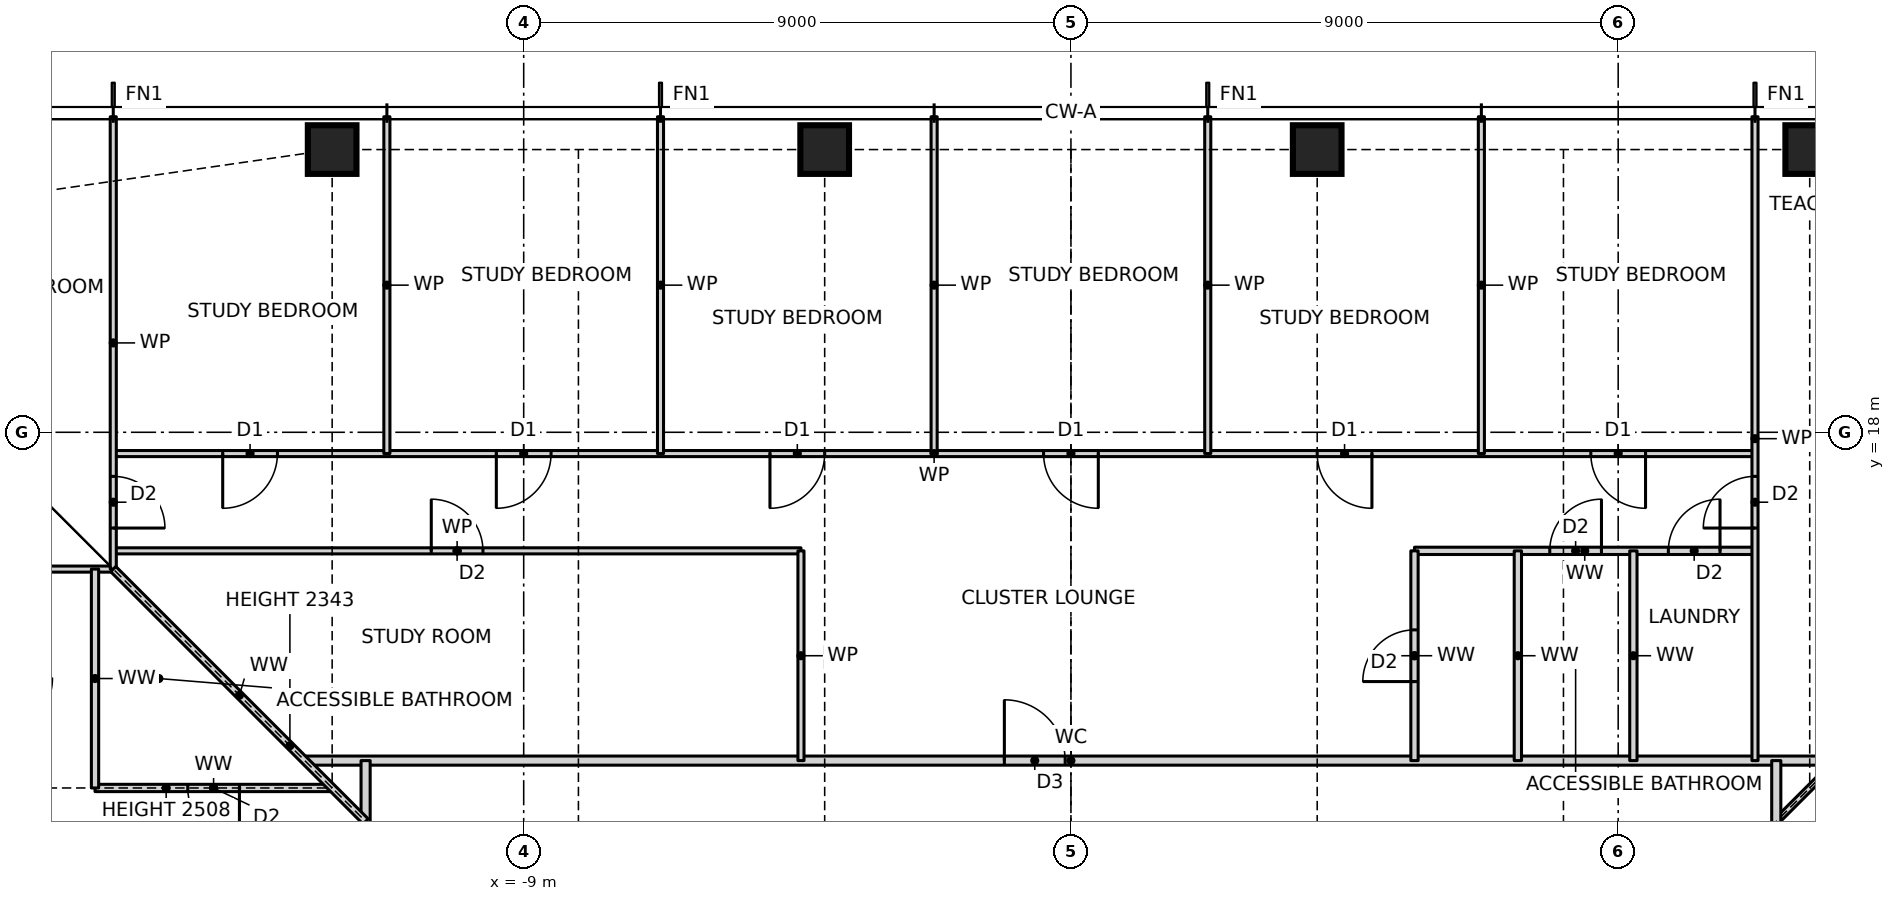
"""IFC4 building model, lengths in metres.
Left out: names, types, materials, properties, quantities, classifications, styles, units other than length and angle.
Written with IfcOpenShell. Run it as: python <this file> out.ifc"""

import sys

from ifc_helpers import new_model, si_unit, direction, frame, frame_2d, origin, origin_2d, place, context, subcontext, project, spatial, rectangle, hollow_rectangle, extrude, element, fill, save


model = new_model("IFC4")
c1 = context("Model", 3, precision=1e-05, world=origin(), true_north=direction((0.0, 1.0)))
c2 = subcontext(c1, "Body", "Model", "MODEL_VIEW")
j1 = project(units=[si_unit("LENGTHUNIT", "METRE"), si_unit("PLANEANGLEUNIT", "RADIAN")], contexts=[c1])
p1 = place(None, origin())
s1 = spatial("IfcSite", under=j1, at=p1, CompositionType="ELEMENT")
p2 = place(p1, origin())
s2 = spatial("IfcBuilding", under=s1, at=p2, CompositionType="ELEMENT")
p3 = place(p2, frame((0.0, 0.0, 64.0)))
s3 = spatial("IfcBuildingStorey", under=s2, at=p3, CompositionType="ELEMENT", Elevation=64.0)
for number, where, z_axis, x_axis in (
    (1, (12.15, 22.65, 0.0), (0.0, 0.0, 1.0), (1.0, 0.0, 0.0)),
    (2, (4.05, 22.65, 0.0), (0.0, 0.0, 1.0), (1.0, 0.0, 0.0)),
    (3, (-4.05, 22.65, 0.0), (0.0, 0.0, 1.0), (1.0, 0.0, 0.0)),
    (4, (-12.15, 22.65, 0.0), (0.0, 0.0, 1.0), (1.0, 0.0, 0.0)),
):
    element("IfcColumn", number, at=place(p3, frame(where, z_axis=z_axis, x_axis=x_axis)), inside=s3, PredefinedType="COLUMN", context=c2, shape_type="SweptSolid", body=[
        extrude(hollow_rectangle(XDim=0.8, YDim=0.8, WallThickness=0.09, at=origin_2d()), origin(), (0.0, 0.0, 1.0), 3.5),
    ])
p4 = place(p3, frame((-16.05, 12.15, 0.0), z_axis=(0.0, 0.0, 1.0), x_axis=(1.0, 0.0, 0.0)))
e5 = element("IfcWall", 5, at=p4, inside=s3, PredefinedType="PARTITIONING", context=c2, shape_type="SweptSolid", body=[
    extrude(rectangle(XDim=3.9, YDim=0.12, at=frame_2d((1.95, 0.0))), origin(), (0.0, 0.0, 1.0), 2.508),
])
p5 = place(p4, frame((1.525, 0.0, 0.0)))
e6 = element("IfcOpeningElement", 6, at=p5, cuts=e5, PredefinedType="OPENING", context=c2, shape_type="SweptSolid", body=[
    extrude(rectangle(XDim=0.85, YDim=2.1, at=frame_2d((0.425, 1.05))), frame((0.0, 0.07, 0.0), z_axis=(0.0, -1.0, 0.0), x_axis=(1.0, 0.0, 0.0)), (0.0, 0.0, 1.0), 0.14),
])
p6 = place(p3, frame((-12.6, 12.6, 0.0), z_axis=(0.0, 0.0, 1.0), x_axis=(1.0, 0.0, 0.0)))
e7 = element("IfcWall", 7, at=p6, inside=s3, PredefinedType="PARTITIONING", context=c2, shape_type="SweptSolid", body=[
    extrude(rectangle(XDim=25.2, YDim=0.15, at=frame_2d((12.6, 0.0))), origin(), (0.0, 0.0, 1.0), 3.27),
])
p7 = place(p6, frame((11.505, 0.0, 0.0)))
e8 = element("IfcOpeningElement", 8, at=p7, cuts=e7, PredefinedType="OPENING", context=c2, shape_type="SweptSolid", body=[
    extrude(rectangle(XDim=1.0, YDim=2.1, at=frame_2d((0.5, 1.05))), frame((0.0, 0.085, 0.0), z_axis=(0.0, -1.0, 0.0), x_axis=(1.0, 0.0, 0.0)), (0.0, 0.0, 1.0), 0.17),
])
p8 = place(p3, frame((-23.19, 15.75, 0.0), z_axis=(0.0, 0.0, 1.0), x_axis=(1.0, 0.0, 0.0)))
e9 = element("IfcWall", 9, at=p8, inside=s3, PredefinedType="PARTITIONING", context=c2, shape_type="SweptSolid", body=[
    extrude(rectangle(XDim=7.44, YDim=0.1, at=frame_2d((3.72, 0.0))), origin(), (0.0, 0.0, 1.0), 3.27),
])
p9 = place(p3, frame((-15.75, 16.05, 0.0), z_axis=(0.0, 0.0, 1.0), x_axis=(1.0, 0.0, 0.0)))
e10 = element("IfcWall", 10, at=p9, inside=s3, PredefinedType="PARTITIONING", context=c2, shape_type="SweptSolid", body=[
    extrude(rectangle(XDim=11.31, YDim=0.1, at=frame_2d((5.655, 0.0))), origin(), (0.0, 0.0, 1.0), 3.27),
])
p10 = place(p9, frame((5.23, 0.0, 0.0)))
e11 = element("IfcOpeningElement", 11, at=p10, cuts=e10, PredefinedType="OPENING", context=c2, shape_type="SweptSolid", body=[
    extrude(rectangle(XDim=0.85, YDim=2.1, at=frame_2d((0.425, 1.05))), frame((0.0, 0.06, 0.0), z_axis=(0.0, -1.0, 0.0), x_axis=(1.0, 0.0, 0.0)), (0.0, 0.0, 1.0), 0.12),
])
p11 = place(p3, frame((5.65, 16.05, 0.0), z_axis=(0.0, 0.0, 1.0), x_axis=(1.0, 0.0, 0.0)))
e12 = element("IfcWall", 12, at=p11, inside=s3, PredefinedType="PARTITIONING", context=c2, shape_type="SweptSolid", body=[
    extrude(rectangle(XDim=5.6, YDim=0.12, at=frame_2d((2.8, 0.0))), origin(), (0.0, 0.0, 1.0), 3.27),
])
p12 = place(p11, frame((4.175, 0.0, 0.0)))
e13 = element("IfcOpeningElement", 13, at=p12, cuts=e12, PredefinedType="OPENING", context=c2, shape_type="SweptSolid", body=[
    extrude(rectangle(XDim=0.85, YDim=2.1, at=frame_2d((0.425, 1.05))), frame((0.0, 0.07, 0.0), z_axis=(0.0, -1.0, 0.0), x_axis=(1.0, 0.0, 0.0)), (0.0, 0.0, 1.0), 0.14),
])
p13 = place(p11, frame((2.225, 0.0, 0.0)))
e14 = element("IfcOpeningElement", 14, at=p13, cuts=e12, PredefinedType="OPENING", context=c2, shape_type="SweptSolid", body=[
    extrude(rectangle(XDim=0.85, YDim=2.1, at=frame_2d((0.425, 1.05))), frame((0.0, 0.07, 0.0), z_axis=(0.0, -1.0, 0.0), x_axis=(1.0, 0.0, 0.0)), (0.0, 0.0, 1.0), 0.14),
])
p14 = place(p3, frame((-15.75, 17.65, 0.0), z_axis=(0.0, 0.0, 1.0), x_axis=(1.0, 0.0, 0.0)))
e15 = element("IfcWall", 15, at=p14, inside=s3, PredefinedType="PARTITIONING", context=c2, shape_type="SweptSolid", body=[
    extrude(rectangle(XDim=27.0, YDim=0.1, at=frame_2d((13.5, 0.0))), origin(), (0.0, 0.0, 1.0), 3.27),
])
p15 = place(p14, frame((24.3, 0.0, 0.0)))
e16 = element("IfcOpeningElement", 16, at=p15, cuts=e15, PredefinedType="OPENING", context=c2, shape_type="SweptSolid", body=[
    extrude(rectangle(XDim=0.9, YDim=2.1, at=frame_2d((0.45, 1.05))), frame((0.0, 0.06, 0.0), z_axis=(0.0, -1.0, 0.0), x_axis=(1.0, 0.0, 0.0)), (0.0, 0.0, 1.0), 0.12),
])
p16 = place(p14, frame((19.8, 0.0, 0.0)))
e17 = element("IfcOpeningElement", 17, at=p16, cuts=e15, PredefinedType="OPENING", context=c2, shape_type="SweptSolid", body=[
    extrude(rectangle(XDim=0.9, YDim=2.1, at=frame_2d((0.45, 1.05))), frame((0.0, 0.06, 0.0), z_axis=(0.0, -1.0, 0.0), x_axis=(1.0, 0.0, 0.0)), (0.0, 0.0, 1.0), 0.12),
])
p17 = place(p14, frame((15.3, 0.0, 0.0)))
e18 = element("IfcOpeningElement", 18, at=p17, cuts=e15, PredefinedType="OPENING", context=c2, shape_type="SweptSolid", body=[
    extrude(rectangle(XDim=0.9, YDim=2.1, at=frame_2d((0.45, 1.05))), frame((0.0, 0.06, 0.0), z_axis=(0.0, -1.0, 0.0), x_axis=(1.0, 0.0, 0.0)), (0.0, 0.0, 1.0), 0.12),
])
p18 = place(p14, frame((10.8, 0.0, 0.0)))
e19 = element("IfcOpeningElement", 19, at=p18, cuts=e15, PredefinedType="OPENING", context=c2, shape_type="SweptSolid", body=[
    extrude(rectangle(XDim=0.9, YDim=2.1, at=frame_2d((0.45, 1.05))), frame((0.0, 0.06, 0.0), z_axis=(0.0, -1.0, 0.0), x_axis=(1.0, 0.0, 0.0)), (0.0, 0.0, 1.0), 0.12),
])
p19 = place(p14, frame((6.3, 0.0, 0.0)))
e20 = element("IfcOpeningElement", 20, at=p19, cuts=e15, PredefinedType="OPENING", context=c2, shape_type="SweptSolid", body=[
    extrude(rectangle(XDim=0.9, YDim=2.1, at=frame_2d((0.45, 1.05))), frame((0.0, 0.06, 0.0), z_axis=(0.0, -1.0, 0.0), x_axis=(1.0, 0.0, 0.0)), (0.0, 0.0, 1.0), 0.12),
])
p20 = place(p14, frame((1.8, 0.0, 0.0)))
e21 = element("IfcOpeningElement", 21, at=p20, cuts=e15, PredefinedType="OPENING", context=c2, shape_type="SweptSolid", body=[
    extrude(rectangle(XDim=0.9, YDim=2.1, at=frame_2d((0.45, 1.05))), frame((0.0, 0.06, 0.0), z_axis=(0.0, -1.0, 0.0), x_axis=(1.0, 0.0, 0.0)), (0.0, 0.0, 1.0), 0.12),
])
p21 = place(p3, frame((11.6, 11.6, 0.0), z_axis=(0.0, 0.0, 1.0), x_axis=(0.707106781187, 0.707106781187, 0.0)))
e22 = element("IfcWall", 22, at=p21, inside=s3, PredefinedType="PARTITIONING", context=c2, shape_type="SweptSolid", body=[
    extrude(rectangle(XDim=5.869, YDim=0.1, at=frame_2d((2.935, 0.0))), origin(), (0.0, 0.0, 1.0), 2.343),
])
p22 = place(p3, frame((11.6, -11.6, 0.0), z_axis=(0.0, 0.0, 1.0), x_axis=(0.0, 1.0, 0.0)))
e23 = element("IfcWall", 23, at=p22, inside=s3, PredefinedType="PARTITIONING", context=c2, shape_type="SweptSolid", body=[
    extrude(rectangle(XDim=24.2, YDim=0.15, at=frame_2d((12.1, 0.0))), origin(), (0.0, 0.0, 1.0), 3.27),
])
p23 = place(p22, frame((14.25, 0.0, 0.0)))
e24 = element("IfcOpeningElement", 24, at=p23, cuts=e23, PredefinedType="OPENING", context=c2, shape_type="SweptSolid", body=[
    extrude(rectangle(XDim=1.0, YDim=2.1, at=frame_2d((0.5, 1.05))), frame((0.0, 0.085, 0.0), z_axis=(0.0, -1.0, 0.0), x_axis=(1.0, 0.0, 0.0)), (0.0, 0.0, 1.0), 0.17),
])
p24 = place(p22, frame((16.4, 0.0, 0.0)))
e25 = element("IfcOpeningElement", 25, at=p24, cuts=e23, PredefinedType="OPENING", context=c2, shape_type="SweptSolid", body=[
    extrude(rectangle(XDim=0.9, YDim=2.1, at=frame_2d((0.45, 1.05))), frame((0.0, 0.085, 0.0), z_axis=(0.0, -1.0, 0.0), x_axis=(1.0, 0.0, 0.0)), (0.0, 0.0, 1.0), 0.17),
])
p25 = place(p3, frame((11.25, 12.6, 0.0), z_axis=(0.0, 0.0, 1.0), x_axis=(0.0, 1.0, 0.0)))
e26 = element("IfcWall", 26, at=p25, inside=s3, PredefinedType="PARTITIONING", context=c2, shape_type="SweptSolid", body=[
    extrude(rectangle(XDim=10.59, YDim=0.1, at=frame_2d((5.295, 0.0))), origin(), (0.0, 0.0, 1.0), 3.27),
])
p26 = place(p25, frame((3.825, 0.0, 0.0)))
e27 = element("IfcOpeningElement", 27, at=p26, cuts=e26, PredefinedType="OPENING", context=c2, shape_type="SweptSolid", body=[
    extrude(rectangle(XDim=0.85, YDim=2.1, at=frame_2d((0.425, 1.05))), frame((0.0, 0.06, 0.0), z_axis=(0.0, -1.0, 0.0), x_axis=(1.0, 0.0, 0.0)), (0.0, 0.0, 1.0), 0.12),
])
for number, where, z_axis, x_axis in (
    (28, (9.25, 12.6, 0.0), (0.0, 0.0, 1.0), (0.0, 1.0, 0.0)),
    (29, (7.35, 12.6, 0.0), (0.0, 0.0, 1.0), (0.0, 1.0, 0.0)),
):
    element("IfcWall", number, at=place(p3, frame(where, z_axis=z_axis, x_axis=x_axis)), inside=s3, PredefinedType="PARTITIONING", context=c2, shape_type="SweptSolid", body=[
        extrude(rectangle(XDim=3.45, YDim=0.12, at=frame_2d((1.725, 0.0))), origin(), (0.0, 0.0, 1.0), 3.27),
    ])
p27 = place(p3, frame((6.75, 17.65, 0.0), z_axis=(0.0, 0.0, 1.0), x_axis=(0.0, 1.0, 0.0)))
e30 = element("IfcWall", 30, at=p27, inside=s3, PredefinedType="PARTITIONING", context=c2, shape_type="SweptSolid", body=[
    extrude(rectangle(XDim=5.54, YDim=0.1, at=frame_2d((2.77, 0.0))), origin(), (0.0, 0.0, 1.0), 3.27),
])
p28 = place(p3, frame((5.65, 12.6, 0.0), z_axis=(0.0, 0.0, 1.0), x_axis=(0.0, 1.0, 0.0)))
e31 = element("IfcWall", 31, at=p28, inside=s3, PredefinedType="PARTITIONING", context=c2, shape_type="SweptSolid", body=[
    extrude(rectangle(XDim=3.45, YDim=0.12, at=frame_2d((1.725, 0.0))), origin(), (0.0, 0.0, 1.0), 3.27),
])
p29 = place(p28, frame((1.3, 0.0, 0.0)))
e32 = element("IfcOpeningElement", 32, at=p29, cuts=e31, PredefinedType="OPENING", context=c2, shape_type="SweptSolid", body=[
    extrude(rectangle(XDim=0.85, YDim=2.1, at=frame_2d((0.425, 1.05))), frame((0.0, 0.07, 0.0), z_axis=(0.0, -1.0, 0.0), x_axis=(1.0, 0.0, 0.0)), (0.0, 0.0, 1.0), 0.14),
])
for number, where, z_axis, x_axis in (
    (33, (2.25, 17.65, 0.0), (0.0, 0.0, 1.0), (0.0, 1.0, 0.0)),
    (34, (-2.25, 17.65, 0.0), (0.0, 0.0, 1.0), (0.0, 1.0, 0.0)),
):
    element("IfcWall", number, at=place(p3, frame(where, z_axis=z_axis, x_axis=x_axis)), inside=s3, PredefinedType="PARTITIONING", context=c2, shape_type="SweptSolid", body=[
        extrude(rectangle(XDim=5.54, YDim=0.1, at=frame_2d((2.77, 0.0))), origin(), (0.0, 0.0, 1.0), 3.27),
    ])
p30 = place(p3, frame((-4.44, 12.6, 0.0), z_axis=(0.0, 0.0, 1.0), x_axis=(0.0, 1.0, 0.0)))
e35 = element("IfcWall", 35, at=p30, inside=s3, PredefinedType="PARTITIONING", context=c2, shape_type="SweptSolid", body=[
    extrude(rectangle(XDim=3.45, YDim=0.1, at=frame_2d((1.725, 0.0))), origin(), (0.0, 0.0, 1.0), 3.27),
])
for number, where, z_axis, x_axis in (
    (36, (-6.75, 17.65, 0.0), (0.0, 0.0, 1.0), (0.0, 1.0, 0.0)),
    (37, (-11.25, 17.65, 0.0), (0.0, 0.0, 1.0), (0.0, 1.0, 0.0)),
):
    element("IfcWall", number, at=place(p3, frame(where, z_axis=z_axis, x_axis=x_axis)), inside=s3, PredefinedType="PARTITIONING", context=c2, shape_type="SweptSolid", body=[
        extrude(rectangle(XDim=5.54, YDim=0.1, at=frame_2d((2.77, 0.0))), origin(), (0.0, 0.0, 1.0), 3.27),
    ])
p31 = place(p3, frame((-11.6, -11.6, 0.0), z_axis=(0.0, 0.0, 1.0), x_axis=(0.0, 1.0, 0.0)))
e38 = element("IfcWall", 38, at=p31, inside=s3, PredefinedType="PARTITIONING", context=c2, shape_type="SweptSolid", body=[
    extrude(rectangle(XDim=24.2, YDim=0.15, at=frame_2d((12.1, 0.0))), origin(), (0.0, 0.0, 1.0), 3.27),
])
p32 = place(p31, frame((19.225, 0.0, 0.0)))
e39 = element("IfcOpeningElement", 39, at=p32, cuts=e38, PredefinedType="OPENING", context=c2, shape_type="SweptSolid", body=[
    extrude(rectangle(XDim=1.0, YDim=2.1, at=frame_2d((0.5, 1.05))), frame((0.0, 0.085, 0.0), z_axis=(0.0, -1.0, 0.0), x_axis=(1.0, 0.0, 0.0)), (0.0, 0.0, 1.0), 0.17),
])
p33 = place(p31, frame((3.425, 0.0, 0.0)))
e40 = element("IfcOpeningElement", 40, at=p33, cuts=e38, PredefinedType="OPENING", context=c2, shape_type="SweptSolid", body=[
    extrude(rectangle(XDim=1.0, YDim=2.1, at=frame_2d((0.5, 1.05))), frame((0.0, 0.085, 0.0), z_axis=(0.0, -1.0, 0.0), x_axis=(1.0, 0.0, 0.0)), (0.0, 0.0, 1.0), 0.17),
])
p34 = place(p3, frame((-15.75, 15.75, 0.0), z_axis=(0.0, 0.0, 1.0), x_axis=(0.0, 1.0, 0.0)))
e41 = element("IfcWall", 41, at=p34, inside=s3, PredefinedType="PARTITIONING", context=c2, shape_type="SweptSolid", body=[
    extrude(rectangle(XDim=7.44, YDim=0.1, at=frame_2d((3.72, 0.0))), origin(), (0.0, 0.0, 1.0), 3.27),
])
p35 = place(p34, frame((0.675, 0.0, 0.0)))
e42 = element("IfcOpeningElement", 42, at=p35, cuts=e41, PredefinedType="OPENING", context=c2, shape_type="SweptSolid", body=[
    extrude(rectangle(XDim=0.85, YDim=2.1, at=frame_2d((0.425, 1.05))), frame((0.0, 0.06, 0.0), z_axis=(0.0, -1.0, 0.0), x_axis=(1.0, 0.0, 0.0)), (0.0, 0.0, 1.0), 0.12),
])
p36 = place(p3, frame((-16.05, 12.15, 0.0), z_axis=(0.0, 0.0, 1.0), x_axis=(0.0, 1.0, 0.0)))
e43 = element("IfcWall", 43, at=p36, inside=s3, PredefinedType="PARTITIONING", context=c2, shape_type="SweptSolid", body=[
    extrude(rectangle(XDim=3.6, YDim=0.12, at=frame_2d((1.8, 0.0))), origin(), (0.0, 0.0, 1.0), 3.27),
])
p37 = place(p3, frame((-11.6, 11.6, 0.0), z_axis=(0.0, 0.0, 1.0), x_axis=(-0.707106781187, 0.707106781187, 0.0)))
e44 = element("IfcWall", 44, at=p37, inside=s3, PredefinedType="PARTITIONING", context=c2, shape_type="SweptSolid", body=[
    extrude(rectangle(XDim=5.869, YDim=0.12, at=frame_2d((2.935, 0.0))), origin(), (0.0, 0.0, 1.0), 2.343),
])
p38 = place(p26, origin())
e45 = element("IfcDoor", 45, at=p38, inside=s3, OperationType="SINGLE_SWING_LEFT", PredefinedType="DOOR", context=c2, shape_type="SweptSolid", body=[
    extrude(rectangle(XDim=0.85, YDim=2.1, at=frame_2d((0.425, 1.05))), frame((0.0, 0.025, 0.0), z_axis=(0.0, -1.0, 0.0), x_axis=(1.0, 0.0, 0.0)), (0.0, 0.0, 1.0), 0.05),
])
fill(e27, e45)
p39 = place(p15, frame((0.9, 0.0, 0.0), z_axis=(0.0, 0.0, 1.0), x_axis=(-1.0, 0.0, 0.0)))
e46 = element("IfcDoor", 46, at=p39, inside=s3, OperationType="SINGLE_SWING_LEFT", PredefinedType="DOOR", context=c2, shape_type="SweptSolid", body=[
    extrude(rectangle(XDim=0.9, YDim=2.1, at=frame_2d((0.45, 1.05))), frame((0.0, 0.025, 0.0), z_axis=(0.0, -1.0, 0.0), x_axis=(1.0, 0.0, 0.0)), (0.0, 0.0, 1.0), 0.05),
])
fill(e16, e46)
p40 = place(p16, frame((0.9, 0.0, 0.0), z_axis=(0.0, 0.0, 1.0), x_axis=(-1.0, 0.0, 0.0)))
e47 = element("IfcDoor", 47, at=p40, inside=s3, OperationType="SINGLE_SWING_LEFT", PredefinedType="DOOR", context=c2, shape_type="SweptSolid", body=[
    extrude(rectangle(XDim=0.9, YDim=2.1, at=frame_2d((0.45, 1.05))), frame((0.0, 0.025, 0.0), z_axis=(0.0, -1.0, 0.0), x_axis=(1.0, 0.0, 0.0)), (0.0, 0.0, 1.0), 0.05),
])
fill(e17, e47)
p41 = place(p17, frame((0.9, 0.0, 0.0), z_axis=(0.0, 0.0, 1.0), x_axis=(-1.0, 0.0, 0.0)))
e48 = element("IfcDoor", 48, at=p41, inside=s3, OperationType="SINGLE_SWING_LEFT", PredefinedType="DOOR", context=c2, shape_type="SweptSolid", body=[
    extrude(rectangle(XDim=0.9, YDim=2.1, at=frame_2d((0.45, 1.05))), frame((0.0, 0.025, 0.0), z_axis=(0.0, -1.0, 0.0), x_axis=(1.0, 0.0, 0.0)), (0.0, 0.0, 1.0), 0.05),
])
fill(e18, e48)
p42 = place(p18, frame((0.9, 0.0, 0.0), z_axis=(0.0, 0.0, 1.0), x_axis=(-1.0, 0.0, 0.0)))
e49 = element("IfcDoor", 49, at=p42, inside=s3, OperationType="SINGLE_SWING_RIGHT", PredefinedType="DOOR", context=c2, shape_type="SweptSolid", body=[
    extrude(rectangle(XDim=0.9, YDim=2.1, at=frame_2d((0.45, 1.05))), frame((0.0, 0.025, 0.0), z_axis=(0.0, -1.0, 0.0), x_axis=(1.0, 0.0, 0.0)), (0.0, 0.0, 1.0), 0.05),
])
fill(e19, e49)
p43 = place(p19, frame((0.9, 0.0, 0.0), z_axis=(0.0, 0.0, 1.0), x_axis=(-1.0, 0.0, 0.0)))
e50 = element("IfcDoor", 50, at=p43, inside=s3, OperationType="SINGLE_SWING_RIGHT", PredefinedType="DOOR", context=c2, shape_type="SweptSolid", body=[
    extrude(rectangle(XDim=0.9, YDim=2.1, at=frame_2d((0.45, 1.05))), frame((0.0, 0.025, 0.0), z_axis=(0.0, -1.0, 0.0), x_axis=(1.0, 0.0, 0.0)), (0.0, 0.0, 1.0), 0.05),
])
fill(e20, e50)
p44 = place(p20, frame((0.9, 0.0, 0.0), z_axis=(0.0, 0.0, 1.0), x_axis=(-1.0, 0.0, 0.0)))
e51 = element("IfcDoor", 51, at=p44, inside=s3, OperationType="SINGLE_SWING_RIGHT", PredefinedType="DOOR", context=c2, shape_type="SweptSolid", body=[
    extrude(rectangle(XDim=0.9, YDim=2.1, at=frame_2d((0.45, 1.05))), frame((0.0, 0.025, 0.0), z_axis=(0.0, -1.0, 0.0), x_axis=(1.0, 0.0, 0.0)), (0.0, 0.0, 1.0), 0.05),
])
fill(e21, e51)
p45 = place(p7, origin())
e52 = element("IfcDoor", 52, at=p45, inside=s3, OperationType="SINGLE_SWING_LEFT", PredefinedType="DOOR", context=c2, shape_type="SweptSolid", body=[
    extrude(rectangle(XDim=1.0, YDim=2.1, at=frame_2d((0.5, 1.05))), frame((0.0, 0.025, 0.0), z_axis=(0.0, -1.0, 0.0), x_axis=(1.0, 0.0, 0.0)), (0.0, 0.0, 1.0), 0.05),
])
fill(e8, e52)
p46 = place(p12, origin())
e53 = element("IfcDoor", 53, at=p46, inside=s3, OperationType="SINGLE_SWING_RIGHT", PredefinedType="DOOR", context=c2, shape_type="SweptSolid", body=[
    extrude(rectangle(XDim=0.85, YDim=2.1, at=frame_2d((0.425, 1.05))), frame((0.0, 0.025, 0.0), z_axis=(0.0, -1.0, 0.0), x_axis=(1.0, 0.0, 0.0)), (0.0, 0.0, 1.0), 0.05),
])
fill(e13, e53)
p47 = place(p13, origin())
e54 = element("IfcDoor", 54, at=p47, inside=s3, OperationType="SINGLE_SWING_RIGHT", PredefinedType="DOOR", context=c2, shape_type="SweptSolid", body=[
    extrude(rectangle(XDim=0.85, YDim=2.1, at=frame_2d((0.425, 1.05))), frame((0.0, 0.025, 0.0), z_axis=(0.0, -1.0, 0.0), x_axis=(1.0, 0.0, 0.0)), (0.0, 0.0, 1.0), 0.05),
])
fill(e14, e54)
p48 = place(p29, origin())
e55 = element("IfcDoor", 55, at=p48, inside=s3, OperationType="SINGLE_SWING_LEFT", PredefinedType="DOOR", context=c2, shape_type="SweptSolid", body=[
    extrude(rectangle(XDim=0.85, YDim=2.1, at=frame_2d((0.425, 1.05))), frame((0.0, 0.025, 0.0), z_axis=(0.0, -1.0, 0.0), x_axis=(1.0, 0.0, 0.0)), (0.0, 0.0, 1.0), 0.05),
])
fill(e32, e55)
p49 = place(p10, origin())
e56 = element("IfcDoor", 56, at=p49, inside=s3, OperationType="SINGLE_SWING_LEFT", PredefinedType="DOOR", context=c2, shape_type="SweptSolid", body=[
    extrude(rectangle(XDim=0.85, YDim=2.1, at=frame_2d((0.425, 1.05))), frame((0.0, 0.025, 0.0), z_axis=(0.0, -1.0, 0.0), x_axis=(1.0, 0.0, 0.0)), (0.0, 0.0, 1.0), 0.05),
])
fill(e11, e56)
p50 = place(p5, frame((0.85, 0.0, 0.0), z_axis=(0.0, 0.0, 1.0), x_axis=(-1.0, 0.0, 0.0)))
e57 = element("IfcDoor", 57, at=p50, inside=s3, OperationType="SINGLE_SWING_LEFT", PredefinedType="DOOR", context=c2, shape_type="SweptSolid", body=[
    extrude(rectangle(XDim=0.85, YDim=2.1, at=frame_2d((0.425, 1.05))), frame((0.0, 0.025, 0.0), z_axis=(0.0, -1.0, 0.0), x_axis=(1.0, 0.0, 0.0)), (0.0, 0.0, 1.0), 0.05),
])
fill(e6, e57)
p51 = place(p35, frame((0.85, 0.0, 0.0), z_axis=(0.0, 0.0, 1.0), x_axis=(-1.0, 0.0, 0.0)))
e58 = element("IfcDoor", 58, at=p51, inside=s3, OperationType="SINGLE_SWING_RIGHT", PredefinedType="DOOR", context=c2, shape_type="SweptSolid", body=[
    extrude(rectangle(XDim=0.85, YDim=2.1, at=frame_2d((0.425, 1.05))), frame((0.0, 0.025, 0.0), z_axis=(0.0, -1.0, 0.0), x_axis=(1.0, 0.0, 0.0)), (0.0, 0.0, 1.0), 0.05),
])
fill(e42, e58)
save(model, sys.argv[1])
